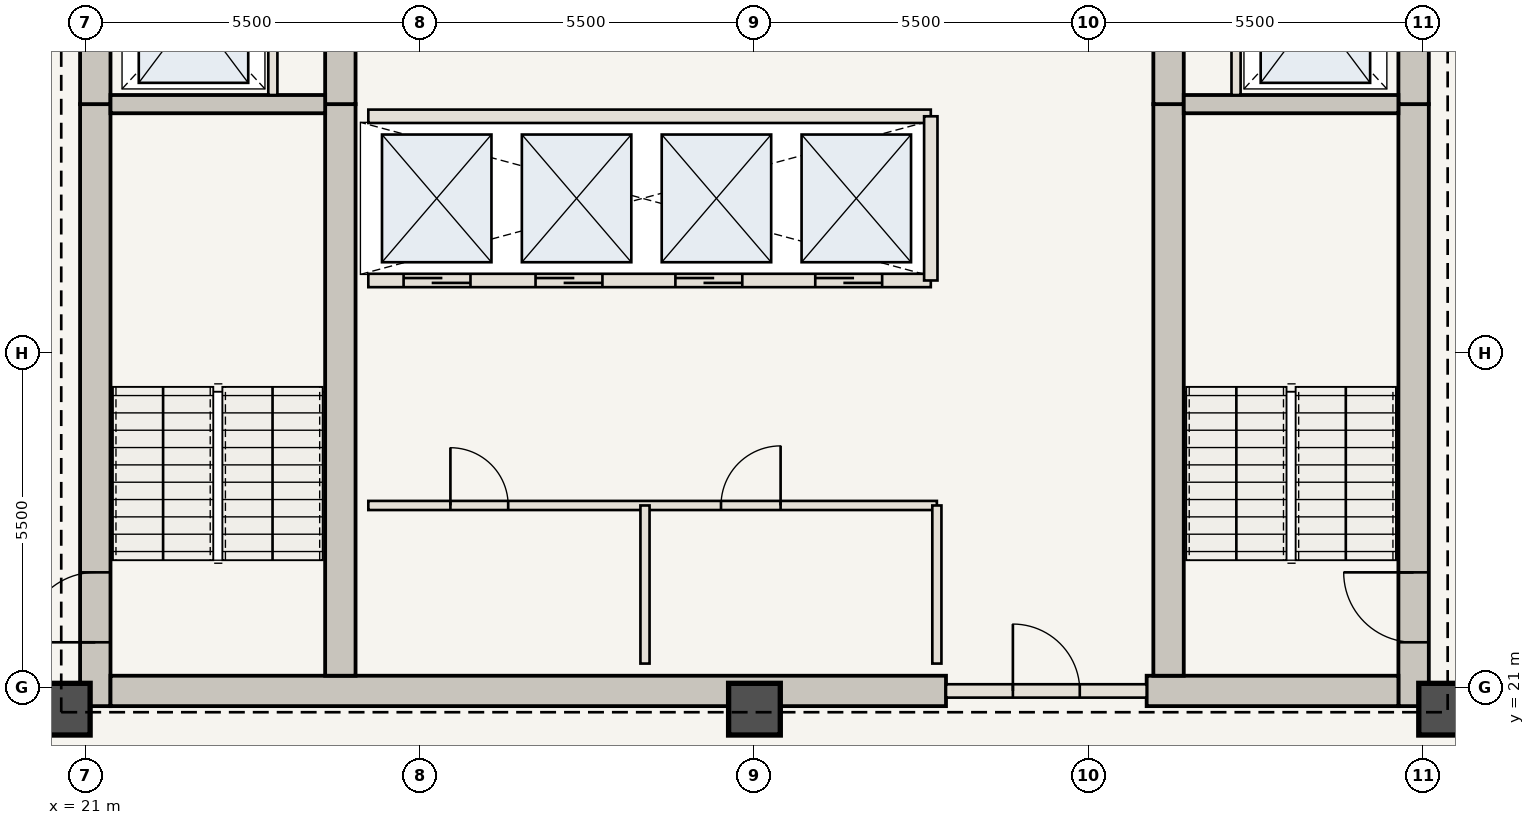
"""IFC4 building model, lengths in metres.
Left out: names, types, materials, properties, quantities, classifications, styles, units other than length and angle.
Written with IfcOpenShell. Run it as: python <this file> out.ifc"""

import sys

from ifc_helpers import new_model, si_unit, direction, frame, frame_2d, origin, origin_2d, place, context, subcontext, project, spatial, rectangle, extrude, element, fill, save


model = new_model("IFC4")
c1 = context("Model", 3, precision=1e-05, world=origin(), true_north=direction((0.0, 1.0)))
c2 = subcontext(c1, "Body", "Model", "MODEL_VIEW")
j1 = project(units=[si_unit("LENGTHUNIT", "METRE"), si_unit("PLANEANGLEUNIT", "RADIAN")], contexts=[c1])
p1 = place(None, origin())
s1 = spatial("IfcSite", under=j1, at=p1, CompositionType="ELEMENT")
p2 = place(p1, origin())
s2 = spatial("IfcBuilding", under=s1, at=p2, CompositionType="ELEMENT")
p3 = place(p2, frame((0.0, 0.0, 213.85)))
s3 = spatial("IfcBuildingStorey", under=s2, at=p3, CompositionType="ELEMENT", Elevation=213.85)
p4 = place(p3, frame((21.16, 20.7, 0.0), z_axis=(0.0, 0.0, 1.0), x_axis=(0.0, 1.0, 0.0)))
e1 = element("IfcWall", 1, at=p4, inside=s3, PredefinedType="SHEAR", context=c2, shape_type="SweptSolid", body=[
    extrude(rectangle(XDim=9.9, YDim=0.5, at=frame_2d((4.95, 0.0))), origin(), (0.0, 0.0, 1.0), 3.85),
])
p5 = place(p4, frame((1.05, 0.0, 0.0)))
e2 = element("IfcOpeningElement", 2, at=p5, cuts=e1, PredefinedType="OPENING", context=c2, shape_type="SweptSolid", body=[
    extrude(rectangle(XDim=1.15, YDim=2.15, at=frame_2d((0.575, 1.075))), frame((0.0, 0.26, 0.0), z_axis=(0.0, -1.0, 0.0), x_axis=(1.0, 0.0, 0.0)), (0.0, 0.0, 1.0), 0.52),
])
p6 = place(p3, frame((21.16, 30.6, 0.0), z_axis=(0.0, 0.0, 1.0), x_axis=(0.0, 1.0, 0.0)))
e3 = element("IfcWall", 3, at=p6, inside=s3, PredefinedType="SHEAR", context=c2, shape_type="SweptSolid", body=[
    extrude(rectangle(XDim=12.65, YDim=0.5, at=frame_2d((6.325, 0.0))), origin(), (0.0, 0.0, 1.0), 3.85),
])
p7 = place(p6, frame((4.2, 0.0, 0.0)))
e4 = element("IfcOpeningElement", 4, at=p7, cuts=e3, PredefinedType="OPENING", context=c2, shape_type="SweptSolid", body=[
    extrude(rectangle(XDim=1.1, YDim=2.15, at=frame_2d((0.55, 1.075))), frame((0.0, 0.26, 0.0), z_axis=(0.0, -1.0, 0.0), x_axis=(1.0, 0.0, 0.0)), (0.0, 0.0, 1.0), 0.52),
])
p8 = place(p6, frame((9.2, 0.0, 0.0)))
e5 = element("IfcOpeningElement", 5, at=p8, cuts=e3, PredefinedType="OPENING", context=c2, shape_type="SweptSolid", body=[
    extrude(rectangle(XDim=0.92, YDim=2.1, at=frame_2d((0.46, 1.05))), frame((0.0, 0.26, 0.0), z_axis=(0.0, -1.0, 0.0), x_axis=(1.0, 0.0, 0.0)), (0.0, 0.0, 1.0), 0.52),
])
p9 = place(p3, frame((42.84, 20.7, 0.0), z_axis=(0.0, 0.0, 1.0), x_axis=(0.0, 1.0, 0.0)))
e6 = element("IfcWall", 6, at=p9, inside=s3, PredefinedType="SHEAR", context=c2, shape_type="SweptSolid", body=[
    extrude(rectangle(XDim=9.9, YDim=0.5, at=frame_2d((4.95, 0.0))), origin(), (0.0, 0.0, 1.0), 3.85),
])
p10 = place(p9, frame((1.05, 0.0, 0.0)))
e7 = element("IfcOpeningElement", 7, at=p10, cuts=e6, PredefinedType="OPENING", context=c2, shape_type="SweptSolid", body=[
    extrude(rectangle(XDim=1.15, YDim=2.15, at=frame_2d((0.575, 1.075))), frame((0.0, 0.26, 0.0), z_axis=(0.0, -1.0, 0.0), x_axis=(1.0, 0.0, 0.0)), (0.0, 0.0, 1.0), 0.52),
])
p11 = place(p3, frame((42.84, 30.6, 0.0), z_axis=(0.0, 0.0, 1.0), x_axis=(0.0, 1.0, 0.0)))
e8 = element("IfcWall", 8, at=p11, inside=s3, PredefinedType="SHEAR", context=c2, shape_type="SweptSolid", body=[
    extrude(rectangle(XDim=12.65, YDim=0.5, at=frame_2d((6.325, 0.0))), origin(), (0.0, 0.0, 1.0), 3.85),
])
p12 = place(p11, frame((4.2, 0.0, 0.0)))
e9 = element("IfcOpeningElement", 9, at=p12, cuts=e8, PredefinedType="OPENING", context=c2, shape_type="SweptSolid", body=[
    extrude(rectangle(XDim=1.1, YDim=2.15, at=frame_2d((0.55, 1.075))), frame((0.0, 0.26, 0.0), z_axis=(0.0, -1.0, 0.0), x_axis=(1.0, 0.0, 0.0)), (0.0, 0.0, 1.0), 0.52),
])
p13 = place(p11, frame((8.4, 0.0, 0.0)))
e10 = element("IfcOpeningElement", 10, at=p13, cuts=e8, PredefinedType="OPENING", context=c2, shape_type="SweptSolid", body=[
    extrude(rectangle(XDim=0.88, YDim=2.1, at=frame_2d((0.44, 1.05))), frame((0.0, 0.26, 0.0), z_axis=(0.0, -1.0, 0.0), x_axis=(1.0, 0.0, 0.0)), (0.0, 0.0, 1.0), 0.52),
])
p14 = place(p11, frame((10.5, 0.0, 0.0)))
e11 = element("IfcOpeningElement", 11, at=p14, cuts=e8, PredefinedType="OPENING", context=c2, shape_type="SweptSolid", body=[
    extrude(rectangle(XDim=0.88, YDim=2.1, at=frame_2d((0.44, 1.05))), frame((0.0, 0.26, 0.0), z_axis=(0.0, -1.0, 0.0), x_axis=(1.0, 0.0, 0.0)), (0.0, 0.0, 1.0), 0.52),
])
p15 = place(p3, frame((21.41, 20.95, 0.0), z_axis=(0.0, 0.0, 1.0), x_axis=(1.0, 0.0, 0.0)))
e12 = element("IfcWall", 12, at=p15, inside=s3, PredefinedType="SHEAR", context=c2, shape_type="SweptSolid", body=[
    extrude(rectangle(XDim=13.74, YDim=0.5, at=frame_2d((6.87, 0.0))), origin(), (0.0, 0.0, 1.0), 3.85),
])
p16 = place(p3, frame((38.45, 20.95, 0.0), z_axis=(0.0, 0.0, 1.0), x_axis=(1.0, 0.0, 0.0)))
e13 = element("IfcWall", 13, at=p16, inside=s3, PredefinedType="SHEAR", context=c2, shape_type="SweptSolid", body=[
    extrude(rectangle(XDim=4.14, YDim=0.5, at=frame_2d((2.07, 0.0))), origin(), (0.0, 0.0, 1.0), 3.85),
])
p17 = place(p3, frame((25.19, 21.2, 0.0), z_axis=(0.0, 0.0, 1.0), x_axis=(0.0, 1.0, 0.0)))
e14 = element("IfcWall", 14, at=p17, inside=s3, PredefinedType="SHEAR", context=c2, shape_type="SweptSolid", body=[
    extrude(rectangle(XDim=9.4, YDim=0.5, at=frame_2d((4.7, 0.0))), origin(), (0.0, 0.0, 1.0), 3.85),
])
p18 = place(p3, frame((25.19, 30.6, 0.0), z_axis=(0.0, 0.0, 1.0), x_axis=(0.0, 1.0, 0.0)))
e15 = element("IfcWall", 15, at=p18, inside=s3, PredefinedType="SHEAR", context=c2, shape_type="SweptSolid", body=[
    extrude(rectangle(XDim=12.15, YDim=0.5, at=frame_2d((6.075, 0.0))), origin(), (0.0, 0.0, 1.0), 3.85),
])
p19 = place(p18, frame((6.25, 0.0, 0.0)))
e16 = element("IfcOpeningElement", 16, at=p19, cuts=e15, PredefinedType="OPENING", context=c2, shape_type="SweptSolid", body=[
    extrude(rectangle(XDim=1.1, YDim=2.15, at=frame_2d((0.55, 1.075))), frame((0.0, 0.26, 0.0), z_axis=(0.0, -1.0, 0.0), x_axis=(1.0, 0.0, 0.0)), (0.0, 0.0, 1.0), 0.52),
])
p20 = place(p3, frame((38.81, 21.2, 0.0), z_axis=(0.0, 0.0, 1.0), x_axis=(0.0, 1.0, 0.0)))
e17 = element("IfcWall", 17, at=p20, inside=s3, PredefinedType="SHEAR", context=c2, shape_type="SweptSolid", body=[
    extrude(rectangle(XDim=9.4, YDim=0.5, at=frame_2d((4.7, 0.0))), origin(), (0.0, 0.0, 1.0), 3.85),
])
p21 = place(p3, frame((38.81, 30.6, 0.0), z_axis=(0.0, 0.0, 1.0), x_axis=(0.0, 1.0, 0.0)))
e18 = element("IfcWall", 18, at=p21, inside=s3, PredefinedType="SHEAR", context=c2, shape_type="SweptSolid", body=[
    extrude(rectangle(XDim=12.15, YDim=0.5, at=frame_2d((6.075, 0.0))), origin(), (0.0, 0.0, 1.0), 3.85),
])
for number, where, z_axis, x_axis in (
    (19, (20.65, 20.65, 0.0), (0.0, 0.0, 1.0), (1.0, 0.0, 0.0)),
    (20, (32.0, 20.65, 0.0), (0.0, 0.0, 1.0), (1.0, 0.0, 0.0)),
    (21, (43.35, 20.65, 0.0), (0.0, 0.0, 1.0), (1.0, 0.0, 0.0)),
):
    element("IfcColumn", number, at=place(p3, frame(where, z_axis=z_axis, x_axis=x_axis)), inside=s3, PredefinedType="COLUMN", context=c2, shape_type="SweptSolid", body=[
        extrude(rectangle(XDim=0.85, YDim=0.85, at=origin_2d()), origin(), (0.0, 0.0, 1.0), 3.85),
    ])
for number, where, z_axis, x_axis in (
    (22, (21.41, 30.6, 0.0), (0.0, 0.0, 1.0), (1.0, 0.0, 0.0)),
    (23, (39.06, 30.6, 0.0), (0.0, 0.0, 1.0), (1.0, 0.0, 0.0)),
):
    element("IfcWall", number, at=place(p3, frame(where, z_axis=z_axis, x_axis=x_axis)), inside=s3, PredefinedType="SHEAR", context=c2, shape_type="SweptSolid", body=[
        extrude(rectangle(XDim=3.53, YDim=0.3, at=frame_2d((1.765, 0.0))), origin(), (0.0, 0.0, 1.0), 3.685),
    ])
for number, where, z_axis, x_axis in (
    (24, (24.08, 30.75, 0.0), (0.0, 0.0, 1.0), (0.0, 1.0, 0.0)),
    (25, (39.92, 30.75, 0.0), (0.0, 0.0, 1.0), (0.0, 1.0, 0.0)),
):
    element("IfcWall", number, at=place(p3, frame(where, z_axis=z_axis, x_axis=x_axis)), inside=s3, PredefinedType="STANDARD", context=c2, shape_type="SweptSolid", body=[
        extrude(rectangle(XDim=2.65, YDim=0.15, at=frame_2d((1.325, 0.0))), origin(), (0.0, 0.0, 1.0), 3.685),
    ])
p22 = place(p3, frame((35.15, 20.95, 0.0), z_axis=(0.0, 0.0, 1.0), x_axis=(1.0, 0.0, 0.0)))
e26 = element("IfcWall", 26, at=p22, inside=s3, PredefinedType="STANDARD", context=c2, shape_type="SweptSolid", body=[
    extrude(rectangle(XDim=3.3, YDim=0.22, at=frame_2d((1.65, 0.0))), origin(), (0.0, 0.0, 1.0), 3.685),
])
p23 = place(p22, frame((1.1, 0.0, 0.0)))
e27 = element("IfcOpeningElement", 27, at=p23, cuts=e26, PredefinedType="OPENING", context=c2, shape_type="SweptSolid", body=[
    extrude(rectangle(XDim=1.1, YDim=2.15, at=frame_2d((0.55, 1.075))), frame((0.0, 0.12, 0.0), z_axis=(0.0, -1.0, 0.0), x_axis=(1.0, 0.0, 0.0)), (0.0, 0.0, 1.0), 0.24),
])
p24 = place(p3, frame((25.65, 24.0, 0.0), z_axis=(0.0, 0.0, 1.0), x_axis=(1.0, 0.0, 0.0)))
e28 = element("IfcWall", 28, at=p24, inside=s3, PredefinedType="STANDARD", context=c2, shape_type="SweptSolid", body=[
    extrude(rectangle(XDim=9.35, YDim=0.15, at=frame_2d((4.675, 0.0))), origin(), (0.0, 0.0, 1.0), 3.685),
])
p25 = place(p24, frame((1.35, 0.0, 0.0)))
e29 = element("IfcOpeningElement", 29, at=p25, cuts=e28, PredefinedType="OPENING", context=c2, shape_type="SweptSolid", body=[
    extrude(rectangle(XDim=0.95, YDim=2.15, at=frame_2d((0.475, 1.075))), frame((0.0, 0.085, 0.0), z_axis=(0.0, -1.0, 0.0), x_axis=(1.0, 0.0, 0.0)), (0.0, 0.0, 1.0), 0.17),
])
p26 = place(p24, frame((5.8, 0.0, 0.0)))
e30 = element("IfcOpeningElement", 30, at=p26, cuts=e28, PredefinedType="OPENING", context=c2, shape_type="SweptSolid", body=[
    extrude(rectangle(XDim=0.98, YDim=2.2, at=frame_2d((0.49, 1.1))), frame((0.0, 0.085, 0.0), z_axis=(0.0, -1.0, 0.0), x_axis=(1.0, 0.0, 0.0)), (0.0, 0.0, 1.0), 0.17),
])
for number, where, z_axis, x_axis in (
    (31, (30.2, 21.4, 0.0), (0.0, 0.0, 1.0), (0.0, 1.0, 0.0)),
    (32, (35.0, 21.4, 0.0), (0.0, 0.0, 1.0), (0.0, 1.0, 0.0)),
):
    element("IfcWall", number, at=place(p3, frame(where, z_axis=z_axis, x_axis=x_axis)), inside=s3, PredefinedType="STANDARD", context=c2, shape_type="SweptSolid", body=[
        extrude(rectangle(XDim=2.6, YDim=0.15, at=frame_2d((1.3, 0.0))), origin(), (0.0, 0.0, 1.0), 3.685),
    ])
p27 = place(p3, frame((25.65, 27.7, 0.0), z_axis=(0.0, 0.0, 1.0), x_axis=(1.0, 0.0, 0.0)))
e33 = element("IfcWall", 33, at=p27, inside=s3, PredefinedType="STANDARD", context=c2, shape_type="SweptSolid", body=[
    extrude(rectangle(XDim=9.25, YDim=0.22, at=frame_2d((4.625, 0.0))), origin(), (0.0, 0.0, 1.0), 3.685),
])
p28 = place(p27, frame((0.58, 0.0, 0.0)))
e34 = element("IfcOpeningElement", 34, at=p28, cuts=e33, PredefinedType="OPENING", context=c2, shape_type="SweptSolid", body=[
    extrude(rectangle(XDim=1.1, YDim=2.15, at=frame_2d((0.55, 1.075))), frame((0.0, 0.12, 0.0), z_axis=(0.0, -1.0, 0.0), x_axis=(1.0, 0.0, 0.0)), (0.0, 0.0, 1.0), 0.24),
])
p29 = place(p27, frame((2.75, 0.0, 0.0)))
e35 = element("IfcOpeningElement", 35, at=p29, cuts=e33, PredefinedType="OPENING", context=c2, shape_type="SweptSolid", body=[
    extrude(rectangle(XDim=1.1, YDim=2.15, at=frame_2d((0.55, 1.075))), frame((0.0, 0.12, 0.0), z_axis=(0.0, -1.0, 0.0), x_axis=(1.0, 0.0, 0.0)), (0.0, 0.0, 1.0), 0.24),
])
p30 = place(p27, frame((5.05, 0.0, 0.0)))
e36 = element("IfcOpeningElement", 36, at=p30, cuts=e33, PredefinedType="OPENING", context=c2, shape_type="SweptSolid", body=[
    extrude(rectangle(XDim=1.1, YDim=2.15, at=frame_2d((0.55, 1.075))), frame((0.0, 0.12, 0.0), z_axis=(0.0, -1.0, 0.0), x_axis=(1.0, 0.0, 0.0)), (0.0, 0.0, 1.0), 0.24),
])
p31 = place(p27, frame((7.35, 0.0, 0.0)))
e37 = element("IfcOpeningElement", 37, at=p31, cuts=e33, PredefinedType="OPENING", context=c2, shape_type="SweptSolid", body=[
    extrude(rectangle(XDim=1.1, YDim=2.15, at=frame_2d((0.55, 1.075))), frame((0.0, 0.12, 0.0), z_axis=(0.0, -1.0, 0.0), x_axis=(1.0, 0.0, 0.0)), (0.0, 0.0, 1.0), 0.24),
])
p32 = place(p3, frame((25.65, 30.4, 0.0), z_axis=(0.0, 0.0, 1.0), x_axis=(1.0, 0.0, 0.0)))
e38 = element("IfcWall", 38, at=p32, inside=s3, PredefinedType="STANDARD", context=c2, shape_type="SweptSolid", body=[
    extrude(rectangle(XDim=9.25, YDim=0.22, at=frame_2d((4.625, 0.0))), origin(), (0.0, 0.0, 1.0), 3.685),
])
p33 = place(p3, frame((34.9, 27.7, 0.0), z_axis=(0.0, 0.0, 1.0), x_axis=(0.0, 1.0, 0.0)))
e39 = element("IfcWall", 39, at=p33, inside=s3, PredefinedType="STANDARD", context=c2, shape_type="SweptSolid", body=[
    extrude(rectangle(XDim=2.7, YDim=0.22, at=frame_2d((1.35, 0.0))), origin(), (0.0, 0.0, 1.0), 3.685),
])
p34 = place(p5, origin())
e40 = element("IfcDoor", 40, at=p34, inside=s3, OperationType="SINGLE_SWING_LEFT", PredefinedType="DOOR", context=c2, shape_type="SweptSolid", body=[
    extrude(rectangle(XDim=1.15, YDim=2.15, at=frame_2d((0.575, 1.075))), frame((0.0, 0.025, 0.0), z_axis=(0.0, -1.0, 0.0), x_axis=(1.0, 0.0, 0.0)), (0.0, 0.0, 1.0), 0.05),
])
fill(e2, e40)
p35 = place(p10, origin())
e41 = element("IfcDoor", 41, at=p35, inside=s3, OperationType="SINGLE_SWING_RIGHT", PredefinedType="DOOR", context=c2, shape_type="SweptSolid", body=[
    extrude(rectangle(XDim=1.15, YDim=2.15, at=frame_2d((0.575, 1.075))), frame((0.0, 0.025, 0.0), z_axis=(0.0, -1.0, 0.0), x_axis=(1.0, 0.0, 0.0)), (0.0, 0.0, 1.0), 0.05),
])
fill(e7, e41)
p36 = place(p23, origin())
e42 = element("IfcDoor", 42, at=p36, inside=s3, OperationType="SINGLE_SWING_LEFT", PredefinedType="DOOR", context=c2, shape_type="SweptSolid", body=[
    extrude(rectangle(XDim=1.1, YDim=2.15, at=frame_2d((0.55, 1.075))), frame((0.0, 0.025, 0.0), z_axis=(0.0, -1.0, 0.0), x_axis=(1.0, 0.0, 0.0)), (0.0, 0.0, 1.0), 0.05),
])
fill(e27, e42)
p37 = place(p25, origin())
e43 = element("IfcDoor", 43, at=p37, inside=s3, OperationType="SINGLE_SWING_LEFT", PredefinedType="DOOR", context=c2, shape_type="SweptSolid", body=[
    extrude(rectangle(XDim=0.95, YDim=2.15, at=frame_2d((0.475, 1.075))), frame((0.0, 0.025, 0.0), z_axis=(0.0, -1.0, 0.0), x_axis=(1.0, 0.0, 0.0)), (0.0, 0.0, 1.0), 0.05),
])
fill(e29, e43)
p38 = place(p26, origin())
e44 = element("IfcDoor", 44, at=p38, inside=s3, OperationType="SINGLE_SWING_RIGHT", PredefinedType="DOOR", context=c2, shape_type="SweptSolid", body=[
    extrude(rectangle(XDim=0.98, YDim=2.2, at=frame_2d((0.49, 1.1))), frame((0.0, 0.025, 0.0), z_axis=(0.0, -1.0, 0.0), x_axis=(1.0, 0.0, 0.0)), (0.0, 0.0, 1.0), 0.05),
])
fill(e30, e44)
p39 = place(p28, origin())
e45 = element("IfcDoor", 45, at=p39, inside=s3, OperationType="DOUBLE_DOOR_SLIDING", PredefinedType="DOOR", context=c2, shape_type="SweptSolid", body=[
    extrude(rectangle(XDim=1.1, YDim=2.15, at=frame_2d((0.55, 1.075))), frame((0.0, 0.025, 0.0), z_axis=(0.0, -1.0, 0.0), x_axis=(1.0, 0.0, 0.0)), (0.0, 0.0, 1.0), 0.05),
])
fill(e34, e45)
p40 = place(p29, origin())
e46 = element("IfcDoor", 46, at=p40, inside=s3, OperationType="DOUBLE_DOOR_SLIDING", PredefinedType="DOOR", context=c2, shape_type="SweptSolid", body=[
    extrude(rectangle(XDim=1.1, YDim=2.15, at=frame_2d((0.55, 1.075))), frame((0.0, 0.025, 0.0), z_axis=(0.0, -1.0, 0.0), x_axis=(1.0, 0.0, 0.0)), (0.0, 0.0, 1.0), 0.05),
])
fill(e35, e46)
p41 = place(p30, origin())
e47 = element("IfcDoor", 47, at=p41, inside=s3, OperationType="DOUBLE_DOOR_SLIDING", PredefinedType="DOOR", context=c2, shape_type="SweptSolid", body=[
    extrude(rectangle(XDim=1.1, YDim=2.15, at=frame_2d((0.55, 1.075))), frame((0.0, 0.025, 0.0), z_axis=(0.0, -1.0, 0.0), x_axis=(1.0, 0.0, 0.0)), (0.0, 0.0, 1.0), 0.05),
])
fill(e36, e47)
p42 = place(p31, origin())
e48 = element("IfcDoor", 48, at=p42, inside=s3, OperationType="DOUBLE_DOOR_SLIDING", PredefinedType="DOOR", context=c2, shape_type="SweptSolid", body=[
    extrude(rectangle(XDim=1.1, YDim=2.15, at=frame_2d((0.55, 1.075))), frame((0.0, 0.025, 0.0), z_axis=(0.0, -1.0, 0.0), x_axis=(1.0, 0.0, 0.0)), (0.0, 0.0, 1.0), 0.05),
])
fill(e37, e48)
save(model, sys.argv[1])
